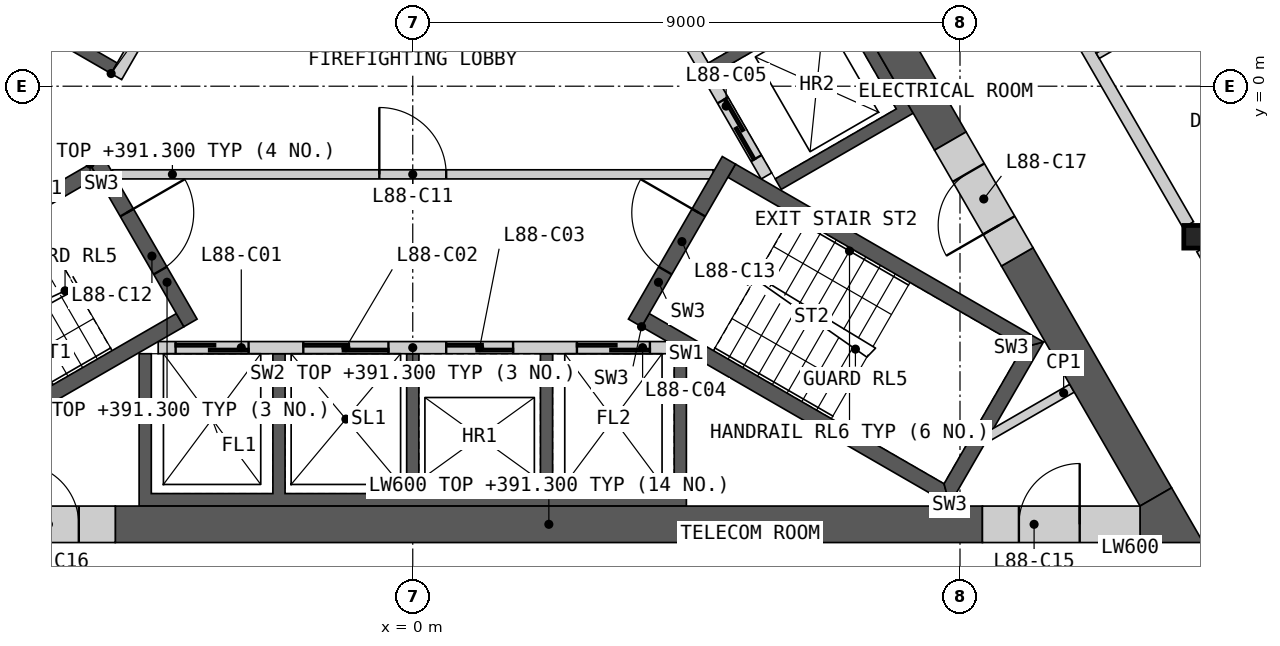
"""IFC4 building model, lengths in metres.
Left out: names, types, materials, properties, quantities, classifications, styles, units other than length and angle.
Written with IfcOpenShell. Run it as: python <this file> out.ifc"""

import sys

from ifc_helpers import new_model, si_unit, direction, frame, frame_2d, origin, origin_2d, place, context, subcontext, project, spatial, polyline, rectangle, i_section, outline, extrude, element, fill, save


model = new_model("IFC4")
c1 = context("Model", 3, precision=1e-05, world=origin(), true_north=direction((0.0, 1.0)))
c2 = subcontext(c1, "Body", "Model", "MODEL_VIEW")
j1 = project(units=[si_unit("LENGTHUNIT", "METRE"), si_unit("PLANEANGLEUNIT", "RADIAN")], contexts=[c1])
p1 = place(None, origin())
s1 = spatial("IfcSite", under=j1, at=p1, CompositionType="ELEMENT")
p2 = place(p1, origin())
s2 = spatial("IfcBuilding", under=s1, at=p2, CompositionType="ELEMENT")
p3 = place(p2, frame((0.0, 0.0, 388.2)))
s3 = spatial("IfcBuildingStorey", under=s2, at=p3, CompositionType="ELEMENT", Elevation=388.2)
p4 = place(p3, frame((12.868, -2.476, 0.0), z_axis=(0.0, 0.0, 1.0), x_axis=(1.0, 0.0, 0.0)))
e1 = element("IfcColumn", 1, at=p4, inside=s3, PredefinedType="COLUMN", context=c2, shape_type="SweptSolid", body=[
    extrude(i_section(OverallWidth=0.374, OverallDepth=0.372, WebThickness=0.016, FlangeThickness=0.026, at=origin_2d()), origin(), (0.0, 0.0, 1.0), 3.4),
])
p5 = place(p3, origin())
e2 = element("IfcWall", 2, at=p5, inside=s3, PredefinedType="SHEAR", context=c2, shape_type="SweptSolid", body=[
    extrude(outline(polyline([(4.5, -4.4), (4.5, -6.906), (-4.5, -6.906), (-4.5, -4.4), (-4.3, -4.4), (-4.3, -6.7), (-2.3, -6.7), (-2.3, -4.4), (-2.1, -4.4), (-2.1, -6.7), (-0.1, -6.7), (-0.1, -4.4), (0.1, -4.4), (0.1, -6.7), (2.1, -6.7), (2.1, -4.4), (2.3, -4.4), (2.3, -6.7), (4.3, -6.7), (4.3, -4.4), (4.5, -4.4)])), origin(), (0.0, 0.0, 1.0), 3.1),
])
p6 = place(p3, frame((-4.187, -4.3, 0.0), z_axis=(0.0, 0.0, 1.0), x_axis=(1.0, 0.0, 0.0)))
e3 = element("IfcWall", 3, at=p6, inside=s3, PredefinedType="SOLIDWALL", context=c2, shape_type="SweptSolid", body=[
    extrude(rectangle(XDim=8.373, YDim=0.2, at=frame_2d((4.187, 0.0))), origin(), (0.0, 0.0, 1.0), 3.1),
])
p7 = place(p6, frame((0.287, 0.0, 0.0)))
e4 = element("IfcOpeningElement", 4, at=p7, cuts=e3, PredefinedType="OPENING", context=c2, shape_type="SweptSolid", body=[
    extrude(rectangle(XDim=1.2, YDim=2.1, at=frame_2d((0.6, 1.05))), frame((0.0, 0.11, 0.0), z_axis=(0.0, -1.0, 0.0), x_axis=(1.0, 0.0, 0.0)), (0.0, 0.0, 1.0), 0.22),
])
p8 = place(p6, frame((2.387, 0.0, 0.0)))
e5 = element("IfcOpeningElement", 5, at=p8, cuts=e3, PredefinedType="OPENING", context=c2, shape_type="SweptSolid", body=[
    extrude(rectangle(XDim=1.4, YDim=2.1, at=frame_2d((0.7, 1.05))), frame((0.0, 0.11, 0.0), z_axis=(0.0, -1.0, 0.0), x_axis=(1.0, 0.0, 0.0)), (0.0, 0.0, 1.0), 0.22),
])
p9 = place(p6, frame((4.737, 0.0, 0.0)))
e6 = element("IfcOpeningElement", 6, at=p9, cuts=e3, PredefinedType="OPENING", context=c2, shape_type="SweptSolid", body=[
    extrude(rectangle(XDim=1.1, YDim=2.1, at=frame_2d((0.55, 1.05))), frame((0.0, 0.11, 0.0), z_axis=(0.0, -1.0, 0.0), x_axis=(1.0, 0.0, 0.0)), (0.0, 0.0, 1.0), 0.22),
])
p10 = place(p6, frame((6.887, 0.0, 0.0)))
e7 = element("IfcOpeningElement", 7, at=p10, cuts=e3, PredefinedType="OPENING", context=c2, shape_type="SweptSolid", body=[
    extrude(rectangle(XDim=1.2, YDim=2.1, at=frame_2d((0.6, 1.05))), frame((0.0, 0.11, 0.0), z_axis=(0.0, -1.0, 0.0), x_axis=(1.0, 0.0, 0.0)), (0.0, 0.0, 1.0), 0.22),
])
p11 = place(p3, origin())
e8 = element("IfcWall", 8, at=p11, inside=s3, PredefinedType="SHEAR", context=c2, shape_type="SweptSolid", body=[
    extrude(outline(polyline([(1.561, 6.097), (3.731, 7.35), (8.231, -0.444), (6.061, -1.697), (5.96, -1.524), (7.952, -0.374), (6.952, 1.358), (4.96, 0.208), (4.861, 0.381), (6.852, 1.531), (5.852, 3.263), (3.861, 2.113), (3.76, 2.287), (5.752, 3.437), (4.752, 5.169), (2.76, 4.019), (2.66, 4.192), (4.652, 5.342), (3.652, 7.074), (1.66, 5.924), (1.561, 6.097)])), origin(), (0.0, 0.0, 1.0), 3.1),
])
p12 = place(p3, frame((5.817, -1.476, 0.0), z_axis=(0.0, 0.0, 1.0), x_axis=(-0.500002616675, 0.866023893041, 0.0)))
e9 = element("IfcWall", 9, at=p12, inside=s3, PredefinedType="SOLIDWALL", context=c2, shape_type="SweptSolid", body=[
    extrude(rectangle(XDim=8.373, YDim=0.2, at=frame_2d((4.187, 0.0))), origin(), (0.0, 0.0, 1.0), 3.1),
])
p13 = place(p12, frame((0.337, 0.0, 0.0)))
e10 = element("IfcOpeningElement", 10, at=p13, cuts=e9, PredefinedType="OPENING", context=c2, shape_type="SweptSolid", body=[
    extrude(rectangle(XDim=1.1, YDim=2.1, at=frame_2d((0.55, 1.05))), frame((0.0, 0.11, 0.0), z_axis=(0.0, -1.0, 0.0), x_axis=(1.0, 0.0, 0.0)), (0.0, 0.0, 1.0), 0.22),
])
p14 = place(p12, frame((2.537, 0.0, 0.0)))
e11 = element("IfcOpeningElement", 11, at=p14, cuts=e9, PredefinedType="OPENING", context=c2, shape_type="SweptSolid", body=[
    extrude(rectangle(XDim=1.1, YDim=2.1, at=frame_2d((0.55, 1.05))), frame((0.0, 0.11, 0.0), z_axis=(0.0, -1.0, 0.0), x_axis=(1.0, 0.0, 0.0)), (0.0, 0.0, 1.0), 0.22),
])
p15 = place(p12, frame((4.737, 0.0, 0.0)))
e12 = element("IfcOpeningElement", 12, at=p15, cuts=e9, PredefinedType="OPENING", context=c2, shape_type="SweptSolid", body=[
    extrude(rectangle(XDim=1.1, YDim=2.1, at=frame_2d((0.55, 1.05))), frame((0.0, 0.11, 0.0), z_axis=(0.0, -1.0, 0.0), x_axis=(1.0, 0.0, 0.0)), (0.0, 0.0, 1.0), 0.22),
])
p16 = place(p12, frame((7.037, 0.0, 0.0)))
e13 = element("IfcOpeningElement", 13, at=p16, cuts=e9, PredefinedType="OPENING", context=c2, shape_type="SweptSolid", body=[
    extrude(rectangle(XDim=0.9, YDim=2.1, at=frame_2d((0.45, 1.05))), frame((0.0, 0.11, 0.0), z_axis=(0.0, -1.0, 0.0), x_axis=(1.0, 0.0, 0.0)), (0.0, 0.0, 1.0), 0.22),
])
p17 = place(p3, origin())
e14 = element("IfcWall", 14, at=p17, inside=s3, PredefinedType="SHEAR", context=c2, shape_type="SweptSolid", body=[
    extrude(outline(polyline([(-4.96, 0.208), (-7.131, 1.461), (-3.731, 7.35), (-1.561, 6.097), (-1.66, 5.924), (-3.652, 7.074), (-4.652, 5.342), (-2.66, 4.192), (-2.76, 4.019), (-4.752, 5.169), (-6.852, 1.531), (-4.861, 0.381), (-4.96, 0.208)])), origin(), (0.0, 0.0, 1.0), 3.1),
])
p18 = place(p3, frame((-1.631, 5.776, 0.0), z_axis=(0.0, 0.0, 1.0), x_axis=(-0.499992876559, -0.866029516466, 0.0)))
e15 = element("IfcWall", 15, at=p18, inside=s3, PredefinedType="SOLIDWALL", context=c2, shape_type="SweptSolid", body=[
    extrude(rectangle(XDim=6.486, YDim=0.2, at=frame_2d((3.243, 0.0))), origin(), (0.0, 0.0, 1.0), 3.1),
])
p19 = place(p18, frame((0.437, 0.0, 0.0)))
e16 = element("IfcOpeningElement", 16, at=p19, cuts=e15, PredefinedType="OPENING", context=c2, shape_type="SweptSolid", body=[
    extrude(rectangle(XDim=0.9, YDim=2.1, at=frame_2d((0.45, 1.05))), frame((0.0, 0.11, 0.0), z_axis=(0.0, -1.0, 0.0), x_axis=(1.0, 0.0, 0.0)), (0.0, 0.0, 1.0), 0.22),
])
p20 = place(p18, frame((3.737, 0.0, 0.0)))
e17 = element("IfcOpeningElement", 17, at=p20, cuts=e15, PredefinedType="OPENING", context=c2, shape_type="SweptSolid", body=[
    extrude(rectangle(XDim=0.9, YDim=2.1, at=frame_2d((0.45, 1.05))), frame((0.0, 0.11, 0.0), z_axis=(0.0, -1.0, 0.0), x_axis=(1.0, 0.0, 0.0)), (0.0, 0.0, 1.0), 0.22),
])
p21 = place(p3, frame((-4.941, -1.45, 0.0), z_axis=(0.0, 0.0, 1.0), x_axis=(1.0, 0.0, 0.0)))
e18 = element("IfcWall", 18, at=p21, inside=s3, PredefinedType="PARTITIONING", context=c2, shape_type="SweptSolid", body=[
    extrude(rectangle(XDim=9.882, YDim=0.15, at=frame_2d((4.941, 0.0))), origin(), (0.0, 0.0, 1.0), 3.1),
])
p22 = place(p21, frame((4.391, 0.0, 0.0)))
e19 = element("IfcOpeningElement", 19, at=p22, cuts=e18, PredefinedType="OPENING", context=c2, shape_type="SweptSolid", body=[
    extrude(rectangle(XDim=1.1, YDim=2.1, at=frame_2d((0.55, 1.05))), frame((0.0, 0.085, 0.0), z_axis=(0.0, -1.0, 0.0), x_axis=(1.0, 0.0, 0.0)), (0.0, 0.0, 1.0), 0.17),
])
p23 = place(p3, origin())
e20 = element("IfcWall", 20, at=p23, inside=s3, PredefinedType="SHEAR", context=c2, shape_type="SweptSolid", body=[
    extrude(outline(polyline([(-5.307, -1.281), (-10.374, -4.206), (-10.032, -4.298), (-5.182, -1.498), (-5.307, -1.281)])), origin(), (0.0, 0.0, 1.0), 3.1),
])
p24 = place(p3, origin())
e21 = element("IfcWall", 21, at=p24, inside=s3, PredefinedType="SHEAR", context=c2, shape_type="SweptSolid", body=[
    extrude(outline(polyline([(-8.738, -6.539), (-8.83, -6.881), (-3.763, -3.956), (-3.888, -3.739), (-8.738, -6.539)])), origin(), (0.0, 0.0, 1.0), 3.1),
])
p25 = place(p3, frame((-5.199, -1.219, 0.0), z_axis=(0.0, 0.0, 1.0), x_axis=(0.499982516597, -0.866035497597, 0.0)))
e22 = element("IfcWall", 22, at=p25, inside=s3, PredefinedType="SHEAR", context=c2, shape_type="SweptSolid", body=[
    extrude(rectangle(XDim=3.088, YDim=0.25, at=frame_2d((1.544, 0.0))), origin(), (0.0, 0.0, 1.0), 3.1),
])
p26 = place(p25, frame((0.994, 0.0, 0.0)))
e23 = element("IfcOpeningElement", 23, at=p26, cuts=e22, PredefinedType="OPENING", context=c2, shape_type="SweptSolid", body=[
    extrude(rectangle(XDim=1.1, YDim=2.1, at=frame_2d((0.55, 1.05))), frame((0.0, 0.135, 0.0), z_axis=(0.0, -1.0, 0.0), x_axis=(1.0, 0.0, 0.0)), (0.0, 0.0, 1.0), 0.27),
])
p27 = place(p3, origin())
e24 = element("IfcWall", 24, at=p27, inside=s3, PredefinedType="SHEAR", context=c2, shape_type="SweptSolid", body=[
    extrude(outline(polyline([(3.763, -3.956), (8.83, -6.881), (8.738, -6.539), (3.888, -3.739), (3.763, -3.956)])), origin(), (0.0, 0.0, 1.0), 3.1),
])
p28 = place(p3, origin())
e25 = element("IfcWall", 25, at=p28, inside=s3, PredefinedType="SHEAR", context=c2, shape_type="SweptSolid", body=[
    extrude(outline(polyline([(8.83, -6.881), (10.374, -4.206), (10.032, -4.298), (8.738, -6.539), (8.83, -6.881)])), origin(), (0.0, 0.0, 1.0), 3.1),
])
p29 = place(p3, origin())
e26 = element("IfcWall", 26, at=p29, inside=s3, PredefinedType="SHEAR", context=c2, shape_type="SweptSolid", body=[
    extrude(outline(polyline([(10.032, -4.298), (10.374, -4.206), (5.307, -1.281), (5.182, -1.498), (10.032, -4.298)])), origin(), (0.0, 0.0, 1.0), 3.1),
])
p30 = place(p3, frame((3.655, -3.893, 0.0), z_axis=(0.0, 0.0, 1.0), x_axis=(0.499982516597, 0.866035497597, 0.0)))
e27 = element("IfcWall", 27, at=p30, inside=s3, PredefinedType="SHEAR", context=c2, shape_type="SweptSolid", body=[
    extrude(rectangle(XDim=3.088, YDim=0.25, at=frame_2d((1.544, 0.0))), origin(), (0.0, 0.0, 1.0), 3.1),
])
p31 = place(p30, frame((0.994, 0.0, 0.0)))
e28 = element("IfcOpeningElement", 28, at=p31, cuts=e27, PredefinedType="OPENING", context=c2, shape_type="SweptSolid", body=[
    extrude(rectangle(XDim=1.1, YDim=2.1, at=frame_2d((0.55, 1.05))), frame((0.0, 0.135, 0.0), z_axis=(0.0, -1.0, 0.0), x_axis=(1.0, 0.0, 0.0)), (0.0, 0.0, 1.0), 0.27),
])
p32 = place(p3, frame((10.842, -4.967, 0.0), z_axis=(0.0, 0.0, 1.0), x_axis=(-0.866098216386, -0.499873863663, 0.0)))
e29 = element("IfcWall", 29, at=p32, inside=s3, PredefinedType="PARTITIONING", context=c2, shape_type="SweptSolid", body=[
    extrude(rectangle(XDim=1.582, YDim=0.15, at=frame_2d((0.791, 0.0))), origin(), (0.0, 0.0, 1.0), 3.1),
])
p33 = place(p3, frame((-4.892, -7.206, 0.0), z_axis=(0.0, 0.0, 1.0), x_axis=(1.0, 0.0, 0.0)))
e30 = element("IfcWall", 30, at=p33, inside=s3, PredefinedType="SHEAR", context=c2, shape_type="SweptSolid", body=[
    extrude(rectangle(XDim=14.261, YDim=0.6, at=frame_2d((7.13, 0.0))), origin(), (0.0, 0.0, 1.0), 3.1),
])
p34 = place(p3, frame((8.841, -0.902, 0.0), z_axis=(0.0, 0.0, 1.0), x_axis=(-0.499995618375, 0.866027933502, 0.0)))
e31 = element("IfcWall", 31, at=p34, inside=s3, PredefinedType="SHEAR", context=c2, shape_type="SweptSolid", body=[
    extrude(rectangle(XDim=14.571, YDim=0.6, at=frame_2d((7.285, 0.0))), origin(), (0.0, 0.0, 1.0), 3.1),
])
p35 = place(p3, frame((12.221, -6.756, 0.0), z_axis=(0.0, 0.0, 1.0), x_axis=(-0.500020646047, 0.866013483456, 0.0)))
e32 = element("IfcWall", 32, at=p35, inside=s3, PredefinedType="SHEAR", context=c2, shape_type="SweptSolid", body=[
    extrude(rectangle(XDim=4.559, YDim=0.6, at=frame_2d((2.28, 0.0))), origin(), (0.0, 0.0, 1.0), 3.1),
])
p36 = place(p3, origin())
e33 = element("IfcWall", 33, at=p36, inside=s3, PredefinedType="SHEAR", context=c2, shape_type="SweptSolid", body=[
    extrude(outline(polyline([(11.961, -7.506), (11.961, -6.906), (12.48, -6.606), (13.0, -7.506), (11.961, -7.506)])), origin(), (0.0, 0.0, 1.0), 3.1),
])
p37 = place(p3, frame((9.369, -7.206, 0.0), z_axis=(0.0, 0.0, 1.0), x_axis=(1.0, 0.0, 0.0)))
e34 = element("IfcWall", 34, at=p37, inside=s3, PredefinedType="SHEAR", context=c2, shape_type="SweptSolid", body=[
    extrude(rectangle(XDim=2.592, YDim=0.6, at=frame_2d((1.296, 0.0))), origin(), (0.0, 0.0, 1.0), 3.1),
])
p38 = place(p37, frame((0.6, 0.0, 0.0)))
e35 = element("IfcOpeningElement", 35, at=p38, cuts=e34, PredefinedType="OPENING", context=c2, shape_type="SweptSolid", body=[
    extrude(rectangle(XDim=1.0, YDim=2.1, at=frame_2d((0.5, 1.05))), frame((0.0, 0.31, 0.0), z_axis=(0.0, -1.0, 0.0), x_axis=(1.0, 0.0, 0.0)), (0.0, 0.0, 1.0), 0.62),
])
p39 = place(p3, frame((-7.092, -7.206, 0.0), z_axis=(0.0, 0.0, 1.0), x_axis=(1.0, 0.0, 0.0)))
e36 = element("IfcWall", 36, at=p39, inside=s3, PredefinedType="SHEAR", context=c2, shape_type="SweptSolid", body=[
    extrude(rectangle(XDim=2.2, YDim=0.6, at=frame_2d((1.1, 0.0))), origin(), (0.0, 0.0, 1.0), 3.1),
])
p40 = place(p39, frame((0.6, 0.0, 0.0)))
e37 = element("IfcOpeningElement", 37, at=p40, cuts=e36, PredefinedType="OPENING", context=c2, shape_type="SweptSolid", body=[
    extrude(rectangle(XDim=1.0, YDim=2.1, at=frame_2d((0.5, 1.05))), frame((0.0, 0.31, 0.0), z_axis=(0.0, -1.0, 0.0), x_axis=(1.0, 0.0, 0.0)), (0.0, 0.0, 1.0), 0.62),
])
p41 = place(p3, frame((9.941, -2.807, 0.0), z_axis=(0.0, 0.0, 1.0), x_axis=(-0.499994660107, 0.866028486751, 0.0)))
e38 = element("IfcWall", 38, at=p41, inside=s3, PredefinedType="SHEAR", context=c2, shape_type="SweptSolid", body=[
    extrude(rectangle(XDim=2.2, YDim=0.6, at=frame_2d((1.1, 0.0))), origin(), (0.0, 0.0, 1.0), 3.1),
])
p42 = place(p41, frame((0.6, 0.0, 0.0)))
e39 = element("IfcOpeningElement", 39, at=p42, cuts=e38, PredefinedType="OPENING", context=c2, shape_type="SweptSolid", body=[
    extrude(rectangle(XDim=1.0, YDim=2.1, at=frame_2d((0.5, 1.05))), frame((0.0, 0.31, 0.0), z_axis=(0.0, -1.0, 0.0), x_axis=(1.0, 0.0, 0.0)), (0.0, 0.0, 1.0), 0.62),
])
p43 = place(p3, frame((8.692, 4.756, 0.0), z_axis=(0.0, 0.0, 1.0), x_axis=(0.500001682468, -0.866024432409, 0.0)))
e40 = element("IfcWall", 40, at=p43, inside=s3, PredefinedType="PARTITIONING", context=c2, shape_type="SweptSolid", body=[
    extrude(rectangle(XDim=8.124, YDim=0.2, at=frame_2d((4.062, 0.0))), origin(), (0.0, 0.0, 1.0), 3.1),
])
p44 = place(p43, frame((1.956, 0.0, 0.0)))
e41 = element("IfcOpeningElement", 41, at=p44, cuts=e40, PredefinedType="OPENING", context=c2, shape_type="SweptSolid", body=[
    extrude(rectangle(XDim=1.0, YDim=2.1, at=frame_2d((0.5, 1.05))), frame((0.0, 0.11, 0.0), z_axis=(0.0, -1.0, 0.0), x_axis=(1.0, 0.0, 0.0)), (0.0, 0.0, 1.0), 0.22),
])
p45 = place(p3, frame((12.981, -2.673, 0.0), z_axis=(0.0, 0.0, 1.0), x_axis=(0.499986217557, -0.866033360935, 0.0)))
e42 = element("IfcWall", 42, at=p45, inside=s3, PredefinedType="PARTITIONING", context=c2, shape_type="SweptSolid", body=[
    extrude(rectangle(XDim=4.3, YDim=0.2, at=frame_2d((2.15, 0.0))), origin(), (0.0, 0.0, 1.0), 3.1),
])
p46 = place(p3, frame((11.265, 0.5, 0.0), z_axis=(0.0, 0.0, 1.0), x_axis=(0.866033839264, 0.499985389037, 0.0)))
e43 = element("IfcWall", 43, at=p46, inside=s3, PredefinedType="PARTITIONING", context=c2, shape_type="SweptSolid", body=[
    extrude(rectangle(XDim=7.1, YDim=0.1, at=frame_2d((3.55, 0.0))), origin(), (0.0, 0.0, 1.0), 2.33),
])
p47 = place(p46, frame((4.588, 0.0, 0.0)))
e44 = element("IfcOpeningElement", 44, at=p47, cuts=e43, PredefinedType="OPENING", context=c2, shape_type="SweptSolid", body=[
    extrude(rectangle(XDim=0.95, YDim=2.1, at=frame_2d((0.475, 1.05))), frame((0.0, 0.06, 0.0), z_axis=(0.0, -1.0, 0.0), x_axis=(1.0, 0.0, 0.0)), (0.0, 0.0, 1.0), 0.12),
])
p48 = place(p7, origin())
e45 = element("IfcDoor", 45, at=p48, inside=s3, OperationType="SLIDING_TO_LEFT", PredefinedType="DOOR", context=c2, shape_type="SweptSolid", body=[
    extrude(rectangle(XDim=1.2, YDim=2.1, at=frame_2d((0.6, 1.05))), frame((0.0, 0.025, 0.0), z_axis=(0.0, -1.0, 0.0), x_axis=(1.0, 0.0, 0.0)), (0.0, 0.0, 1.0), 0.05),
])
fill(e4, e45)
p49 = place(p8, origin())
e46 = element("IfcDoor", 46, at=p49, inside=s3, OperationType="SLIDING_TO_LEFT", PredefinedType="DOOR", context=c2, shape_type="SweptSolid", body=[
    extrude(rectangle(XDim=1.4, YDim=2.1, at=frame_2d((0.7, 1.05))), frame((0.0, 0.025, 0.0), z_axis=(0.0, -1.0, 0.0), x_axis=(1.0, 0.0, 0.0)), (0.0, 0.0, 1.0), 0.05),
])
fill(e5, e46)
p50 = place(p9, origin())
e47 = element("IfcDoor", 47, at=p50, inside=s3, OperationType="SLIDING_TO_LEFT", PredefinedType="DOOR", context=c2, shape_type="SweptSolid", body=[
    extrude(rectangle(XDim=1.1, YDim=2.1, at=frame_2d((0.55, 1.05))), frame((0.0, 0.025, 0.0), z_axis=(0.0, -1.0, 0.0), x_axis=(1.0, 0.0, 0.0)), (0.0, 0.0, 1.0), 0.05),
])
fill(e6, e47)
p51 = place(p10, origin())
e48 = element("IfcDoor", 48, at=p51, inside=s3, OperationType="SLIDING_TO_LEFT", PredefinedType="DOOR", context=c2, shape_type="SweptSolid", body=[
    extrude(rectangle(XDim=1.2, YDim=2.1, at=frame_2d((0.6, 1.05))), frame((0.0, 0.025, 0.0), z_axis=(0.0, -1.0, 0.0), x_axis=(1.0, 0.0, 0.0)), (0.0, 0.0, 1.0), 0.05),
])
fill(e7, e48)
p52 = place(p13, origin())
e49 = element("IfcDoor", 49, at=p52, inside=s3, OperationType="SLIDING_TO_LEFT", PredefinedType="DOOR", context=c2, shape_type="SweptSolid", body=[
    extrude(rectangle(XDim=1.1, YDim=2.1, at=frame_2d((0.55, 1.05))), frame((0.0, 0.025, 0.0), z_axis=(0.0, -1.0, 0.0), x_axis=(1.0, 0.0, 0.0)), (0.0, 0.0, 1.0), 0.05),
])
fill(e10, e49)
p53 = place(p22, origin())
e50 = element("IfcDoor", 50, at=p53, inside=s3, OperationType="SINGLE_SWING_LEFT", PredefinedType="DOOR", context=c2, shape_type="SweptSolid", body=[
    extrude(rectangle(XDim=1.1, YDim=2.1, at=frame_2d((0.55, 1.05))), frame((0.0, 0.025, 0.0), z_axis=(0.0, -1.0, 0.0), x_axis=(1.0, 0.0, 0.0)), (0.0, 0.0, 1.0), 0.05),
])
fill(e19, e50)
p54 = place(p26, origin())
e51 = element("IfcDoor", 51, at=p54, inside=s3, OperationType="SINGLE_SWING_LEFT", PredefinedType="DOOR", context=c2, shape_type="SweptSolid", body=[
    extrude(rectangle(XDim=1.1, YDim=2.1, at=frame_2d((0.55, 1.05))), frame((0.0, 0.025, 0.0), z_axis=(0.0, -1.0, 0.0), x_axis=(1.0, 0.0, 0.0)), (0.0, 0.0, 1.0), 0.05),
])
fill(e23, e51)
p55 = place(p31, origin())
e52 = element("IfcDoor", 52, at=p55, inside=s3, OperationType="SINGLE_SWING_RIGHT", PredefinedType="DOOR", context=c2, shape_type="SweptSolid", body=[
    extrude(rectangle(XDim=1.1, YDim=2.1, at=frame_2d((0.55, 1.05))), frame((0.0, 0.025, 0.0), z_axis=(0.0, -1.0, 0.0), x_axis=(1.0, 0.0, 0.0)), (0.0, 0.0, 1.0), 0.05),
])
fill(e28, e52)
p56 = place(p38, origin())
e53 = element("IfcDoor", 53, at=p56, inside=s3, OperationType="SINGLE_SWING_RIGHT", PredefinedType="DOOR", context=c2, shape_type="SweptSolid", body=[
    extrude(rectangle(XDim=1.0, YDim=2.1, at=frame_2d((0.5, 1.05))), frame((0.0, 0.055, 0.0), z_axis=(0.0, -1.0, 0.0), x_axis=(1.0, 0.0, 0.0)), (0.0, 0.0, 1.0), 0.05),
])
fill(e35, e53)
p57 = place(p40, origin())
e54 = element("IfcDoor", 54, at=p57, inside=s3, OperationType="SINGLE_SWING_LEFT", PredefinedType="DOOR", context=c2, shape_type="SweptSolid", body=[
    extrude(rectangle(XDim=1.0, YDim=2.1, at=frame_2d((0.5, 1.05))), frame((0.0, 0.055, 0.0), z_axis=(0.0, -1.0, 0.0), x_axis=(1.0, 0.0, 0.0)), (0.0, 0.0, 1.0), 0.05),
])
fill(e37, e54)
p58 = place(p42, origin())
e55 = element("IfcDoor", 55, at=p58, inside=s3, OperationType="SINGLE_SWING_LEFT", PredefinedType="DOOR", context=c2, shape_type="SweptSolid", body=[
    extrude(rectangle(XDim=1.0, YDim=2.1, at=frame_2d((0.5, 1.05))), frame((0.0, 0.055, 0.0), z_axis=(0.0, -1.0, 0.0), x_axis=(1.0, 0.0, 0.0)), (0.0, 0.0, 1.0), 0.05),
])
fill(e39, e55)
save(model, sys.argv[1])
